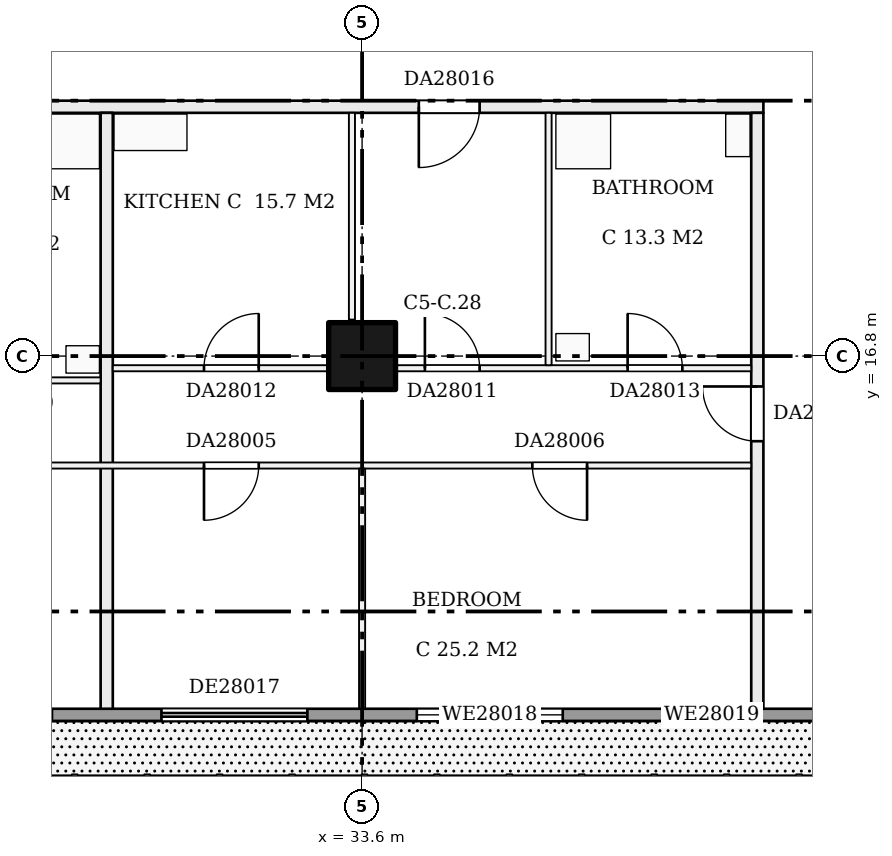
"""IFC4 building model, lengths in metres.
Left out: names, types, materials, properties, quantities, classifications, styles, units other than length and angle.
Written with IfcOpenShell. Run it as: python <this file> out.ifc"""

import sys

from ifc_helpers import new_model, si_unit, direction, frame, frame_2d, origin, origin_2d, place, context, subcontext, project, spatial, rectangle, extrude, element, fill, save


model = new_model("IFC4")
c1 = context("Model", 3, precision=1e-05, world=origin(), true_north=direction((0.0, 1.0)))
c2 = subcontext(c1, "Body", "Model", "MODEL_VIEW")
j1 = project(units=[si_unit("LENGTHUNIT", "METRE"), si_unit("PLANEANGLEUNIT", "RADIAN")], contexts=[c1])
p1 = place(None, origin())
s1 = spatial("IfcSite", under=j1, at=p1, CompositionType="ELEMENT")
p2 = place(p1, origin())
s2 = spatial("IfcBuilding", under=s1, at=p2, CompositionType="ELEMENT")
p3 = place(p2, frame((0.0, 0.0, 112.7)))
s3 = spatial("IfcBuildingStorey", under=s2, at=p3, CompositionType="ELEMENT", Elevation=112.7)
p4 = place(p3, frame((33.6, 16.8, 0.0), z_axis=(0.0, 0.0, 1.0), x_axis=(1.0, 0.0, 0.0)))
e1 = element("IfcColumn", 1, at=p4, inside=s3, PredefinedType="COLUMN", context=c2, shape_type="SweptSolid", body=[
    extrude(rectangle(XDim=1.1, YDim=1.1, at=origin_2d()), origin(), (0.0, 0.0, 1.0), 3.22),
])
p5 = place(p3, frame((16.9, 15.0, 0.0), z_axis=(0.0, 0.0, 1.0), x_axis=(1.0, 0.0, 0.0)))
e2 = element("IfcWall", 2, at=p5, inside=s3, PredefinedType="PARTITIONING", context=c2, shape_type="SweptSolid", body=[
    extrude(rectangle(XDim=23.1, YDim=0.1, at=frame_2d((11.55, 0.0))), origin(), (0.0, 0.0, 1.0), 3.22),
])
p6 = place(p5, frame((1.6, 0.0, 0.0)))
e3 = element("IfcOpeningElement", 3, at=p6, cuts=e2, PredefinedType="OPENING", context=c2, shape_type="SweptSolid", body=[
    extrude(rectangle(XDim=0.9, YDim=2.1, at=frame_2d((0.45, 1.05))), frame((0.0, 0.06, 0.0), z_axis=(0.0, -1.0, 0.0), x_axis=(1.0, 0.0, 0.0)), (0.0, 0.0, 1.0), 0.12),
])
p7 = place(p5, frame((5.8, 0.0, 0.0)))
e4 = element("IfcOpeningElement", 4, at=p7, cuts=e2, PredefinedType="OPENING", context=c2, shape_type="SweptSolid", body=[
    extrude(rectangle(XDim=0.9, YDim=2.1, at=frame_2d((0.45, 1.05))), frame((0.0, 0.06, 0.0), z_axis=(0.0, -1.0, 0.0), x_axis=(1.0, 0.0, 0.0)), (0.0, 0.0, 1.0), 0.12),
])
p8 = place(p5, frame((9.9, 0.0, 0.0)))
e5 = element("IfcOpeningElement", 5, at=p8, cuts=e2, PredefinedType="OPENING", context=c2, shape_type="SweptSolid", body=[
    extrude(rectangle(XDim=0.9, YDim=2.1, at=frame_2d((0.45, 1.05))), frame((0.0, 0.06, 0.0), z_axis=(0.0, -1.0, 0.0), x_axis=(1.0, 0.0, 0.0)), (0.0, 0.0, 1.0), 0.12),
])
p9 = place(p5, frame((14.1, 0.0, 0.0)))
e6 = element("IfcOpeningElement", 6, at=p9, cuts=e2, PredefinedType="OPENING", context=c2, shape_type="SweptSolid", body=[
    extrude(rectangle(XDim=0.9, YDim=2.1, at=frame_2d((0.45, 1.05))), frame((0.0, 0.06, 0.0), z_axis=(0.0, -1.0, 0.0), x_axis=(1.0, 0.0, 0.0)), (0.0, 0.0, 1.0), 0.12),
])
p10 = place(p5, frame((19.5, 0.0, 0.0)))
e7 = element("IfcOpeningElement", 7, at=p10, cuts=e2, PredefinedType="OPENING", context=c2, shape_type="SweptSolid", body=[
    extrude(rectangle(XDim=0.9, YDim=2.1, at=frame_2d((0.45, 1.05))), frame((0.0, 0.06, 0.0), z_axis=(0.0, -1.0, 0.0), x_axis=(1.0, 0.0, 0.0)), (0.0, 0.0, 1.0), 0.12),
])
p11 = place(p3, frame((16.9, 16.4, 0.0), z_axis=(0.0, 0.0, 1.0), x_axis=(1.0, 0.0, 0.0)))
e8 = element("IfcWall", 8, at=p11, inside=s3, PredefinedType="PARTITIONING", context=c2, shape_type="SweptSolid", body=[
    extrude(rectangle(XDim=12.4, YDim=0.1, at=frame_2d((6.2, 0.0))), origin(), (0.0, 0.0, 1.0), 3.22),
])
p12 = place(p11, frame((1.7, 0.0, 0.0)))
e9 = element("IfcOpeningElement", 9, at=p12, cuts=e8, PredefinedType="OPENING", context=c2, shape_type="SweptSolid", body=[
    extrude(rectangle(XDim=0.9, YDim=2.1, at=frame_2d((0.45, 1.05))), frame((0.0, 0.06, 0.0), z_axis=(0.0, -1.0, 0.0), x_axis=(1.0, 0.0, 0.0)), (0.0, 0.0, 1.0), 0.12),
])
p13 = place(p11, frame((3.775, 0.0, 0.0)))
e10 = element("IfcOpeningElement", 10, at=p13, cuts=e8, PredefinedType="OPENING", context=c2, shape_type="SweptSolid", body=[
    extrude(rectangle(XDim=0.9, YDim=2.1, at=frame_2d((0.45, 1.05))), frame((0.0, 0.06, 0.0), z_axis=(0.0, -1.0, 0.0), x_axis=(1.0, 0.0, 0.0)), (0.0, 0.0, 1.0), 0.12),
])
p14 = place(p11, frame((6.65, 0.0, 0.0)))
e11 = element("IfcOpeningElement", 11, at=p14, cuts=e8, PredefinedType="OPENING", context=c2, shape_type="SweptSolid", body=[
    extrude(rectangle(XDim=0.9, YDim=2.1, at=frame_2d((0.45, 1.05))), frame((0.0, 0.06, 0.0), z_axis=(0.0, -1.0, 0.0), x_axis=(1.0, 0.0, 0.0)), (0.0, 0.0, 1.0), 0.12),
])
p15 = place(p11, frame((10.425, 0.0, 0.0)))
e12 = element("IfcOpeningElement", 12, at=p15, cuts=e8, PredefinedType="OPENING", context=c2, shape_type="SweptSolid", body=[
    extrude(rectangle(XDim=0.9, YDim=2.1, at=frame_2d((0.45, 1.05))), frame((0.0, 0.06, 0.0), z_axis=(0.0, -1.0, 0.0), x_axis=(1.0, 0.0, 0.0)), (0.0, 0.0, 1.0), 0.12),
])
p16 = place(p3, frame((29.5, 16.6, 0.0), z_axis=(0.0, 0.0, 1.0), x_axis=(1.0, 0.0, 0.0)))
e13 = element("IfcWall", 13, at=p16, inside=s3, PredefinedType="PARTITIONING", context=c2, shape_type="SweptSolid", body=[
    extrude(rectangle(XDim=10.5, YDim=0.1, at=frame_2d((5.25, 0.0))), origin(), (0.0, 0.0, 1.0), 3.22),
])
p17 = place(p16, frame((5.133, 0.0, 0.0)))
e14 = element("IfcOpeningElement", 14, at=p17, cuts=e13, PredefinedType="OPENING", context=c2, shape_type="SweptSolid", body=[
    extrude(rectangle(XDim=0.9, YDim=2.1, at=frame_2d((0.45, 1.05))), frame((0.0, 0.06, 0.0), z_axis=(0.0, -1.0, 0.0), x_axis=(1.0, 0.0, 0.0)), (0.0, 0.0, 1.0), 0.12),
])
p18 = place(p16, frame((1.5, 0.0, 0.0)))
e15 = element("IfcOpeningElement", 15, at=p18, cuts=e13, PredefinedType="OPENING", context=c2, shape_type="SweptSolid", body=[
    extrude(rectangle(XDim=0.9, YDim=2.1, at=frame_2d((0.45, 1.05))), frame((0.0, 0.06, 0.0), z_axis=(0.0, -1.0, 0.0), x_axis=(1.0, 0.0, 0.0)), (0.0, 0.0, 1.0), 0.12),
])
p19 = place(p16, frame((8.467, 0.0, 0.0)))
e16 = element("IfcOpeningElement", 16, at=p19, cuts=e13, PredefinedType="OPENING", context=c2, shape_type="SweptSolid", body=[
    extrude(rectangle(XDim=0.9, YDim=2.1, at=frame_2d((0.45, 1.05))), frame((0.0, 0.06, 0.0), z_axis=(0.0, -1.0, 0.0), x_axis=(1.0, 0.0, 0.0)), (0.0, 0.0, 1.0), 0.12),
])
p20 = place(p3, frame((16.9, 20.9, 0.0), z_axis=(0.0, 0.0, 1.0), x_axis=(1.0, 0.0, 0.0)))
e17 = element("IfcWall", 17, at=p20, inside=s3, PredefinedType="PARTITIONING", context=c2, shape_type="SweptSolid", body=[
    extrude(rectangle(XDim=23.3, YDim=0.2, at=frame_2d((11.65, 0.0))), origin(), (0.0, 0.0, 1.0), 3.22),
])
p21 = place(p20, frame((1.0, 0.0, 0.0)))
e18 = element("IfcOpeningElement", 18, at=p21, cuts=e17, PredefinedType="OPENING", context=c2, shape_type="SweptSolid", body=[
    extrude(rectangle(XDim=1.0, YDim=2.1, at=frame_2d((0.5, 1.05))), frame((0.0, 0.11, 0.0), z_axis=(0.0, -1.0, 0.0), x_axis=(1.0, 0.0, 0.0)), (0.0, 0.0, 1.0), 0.22),
])
p22 = place(p20, frame((17.633, 0.0, 0.0)))
e19 = element("IfcOpeningElement", 19, at=p22, cuts=e17, PredefinedType="OPENING", context=c2, shape_type="SweptSolid", body=[
    extrude(rectangle(XDim=1.0, YDim=2.1, at=frame_2d((0.5, 1.05))), frame((0.0, 0.11, 0.0), z_axis=(0.0, -1.0, 0.0), x_axis=(1.0, 0.0, 0.0)), (0.0, 0.0, 1.0), 0.22),
])
p23 = place(p3, frame((29.4, 10.9, 0.0), z_axis=(0.0, 0.0, 1.0), x_axis=(0.0, 1.0, 0.0)))
e20 = element("IfcWall", 20, at=p23, inside=s3, PredefinedType="PARTITIONING", context=c2, shape_type="SweptSolid", body=[
    extrude(rectangle(XDim=9.9, YDim=0.2, at=frame_2d((4.95, 0.0))), origin(), (0.0, 0.0, 1.0), 3.22),
])
p24 = place(p3, frame((33.433, 17.4, 0.0), z_axis=(0.0, 0.0, 1.0), x_axis=(0.0, 1.0, 0.0)))
e21 = element("IfcWall", 21, at=p24, inside=s3, PredefinedType="PARTITIONING", context=c2, shape_type="SweptSolid", body=[
    extrude(rectangle(XDim=3.4, YDim=0.1, at=frame_2d((1.7, 0.0))), origin(), (0.0, 0.0, 1.0), 3.22),
])
p25 = place(p3, frame((33.6, 10.9, 0.0), z_axis=(0.0, 0.0, 1.0), x_axis=(0.0, 1.0, 0.0)))
e22 = element("IfcWall", 22, at=p25, inside=s3, PredefinedType="PARTITIONING", context=c2, shape_type="SweptSolid", body=[
    extrude(rectangle(XDim=4.05, YDim=0.1, at=frame_2d((2.025, 0.0))), origin(), (0.0, 0.0, 1.0), 3.22),
])
p26 = place(p3, frame((36.667, 16.65, 0.0), z_axis=(0.0, 0.0, 1.0), x_axis=(0.0, 1.0, 0.0)))
e23 = element("IfcWall", 23, at=p26, inside=s3, PredefinedType="PARTITIONING", context=c2, shape_type="SweptSolid", body=[
    extrude(rectangle(XDim=4.15, YDim=0.1, at=frame_2d((2.075, 0.0))), origin(), (0.0, 0.0, 1.0), 3.22),
])
p27 = place(p3, frame((40.1, 10.9, 0.0), z_axis=(0.0, 0.0, 1.0), x_axis=(0.0, 1.0, 0.0)))
e24 = element("IfcWall", 24, at=p27, inside=s3, PredefinedType="PARTITIONING", context=c2, shape_type="SweptSolid", body=[
    extrude(rectangle(XDim=9.9, YDim=0.2, at=frame_2d((4.95, 0.0))), origin(), (0.0, 0.0, 1.0), 3.22),
])
p28 = place(p27, frame((4.5, 0.0, 0.0)))
e25 = element("IfcOpeningElement", 25, at=p28, cuts=e24, PredefinedType="OPENING", context=c2, shape_type="SweptSolid", body=[
    extrude(rectangle(XDim=0.9, YDim=2.1, at=frame_2d((0.45, 1.05))), frame((0.0, 0.11, 0.0), z_axis=(0.0, -1.0, 0.0), x_axis=(1.0, 0.0, 0.0)), (0.0, 0.0, 1.0), 0.22),
])
p29 = place(p3, frame((4.8, 10.9, 0.0), z_axis=(0.0, 0.0, 1.0), x_axis=(1.0, 0.0, 0.0)))
e26 = element("IfcWall", 26, at=p29, inside=s3, PredefinedType="SOLIDWALL", context=c2, shape_type="SweptSolid", body=[
    extrude(rectangle(XDim=37.2, YDim=0.2, at=frame_2d((18.6, 0.0))), origin(), (0.0, 0.0, 1.0), 3.22),
])
p30 = place(p29, frame((0.3, 0.0, 0.9)))
e27 = element("IfcOpeningElement", 27, at=p30, cuts=e26, PredefinedType="OPENING", context=c2, shape_type="SweptSolid", body=[
    extrude(rectangle(XDim=2.4, YDim=1.5, at=frame_2d((1.2, 0.75))), frame((0.0, 0.11, 0.0), z_axis=(0.0, -1.0, 0.0), x_axis=(1.0, 0.0, 0.0)), (0.0, 0.0, 1.0), 0.22),
])
p31 = place(p29, frame((4.2, 0.0, 0.9)))
e28 = element("IfcOpeningElement", 28, at=p31, cuts=e26, PredefinedType="OPENING", context=c2, shape_type="SweptSolid", body=[
    extrude(rectangle(XDim=2.4, YDim=1.5, at=frame_2d((1.2, 0.75))), frame((0.0, 0.11, 0.0), z_axis=(0.0, -1.0, 0.0), x_axis=(1.0, 0.0, 0.0)), (0.0, 0.0, 1.0), 0.22),
])
p32 = place(p29, frame((12.9, 0.0, 0.0)))
e29 = element("IfcOpeningElement", 29, at=p32, cuts=e26, PredefinedType="OPENING", context=c2, shape_type="SweptSolid", body=[
    extrude(rectangle(XDim=2.4, YDim=2.2, at=frame_2d((1.2, 1.1))), frame((0.0, 0.11, 0.0), z_axis=(0.0, -1.0, 0.0), x_axis=(1.0, 0.0, 0.0)), (0.0, 0.0, 1.0), 0.22),
])
p33 = place(p29, frame((17.1, 0.0, 0.9)))
e30 = element("IfcOpeningElement", 30, at=p33, cuts=e26, PredefinedType="OPENING", context=c2, shape_type="SweptSolid", body=[
    extrude(rectangle(XDim=2.4, YDim=1.5, at=frame_2d((1.2, 0.75))), frame((0.0, 0.11, 0.0), z_axis=(0.0, -1.0, 0.0), x_axis=(1.0, 0.0, 0.0)), (0.0, 0.0, 1.0), 0.22),
])
p34 = place(p29, frame((21.3, 0.0, 0.9)))
e31 = element("IfcOpeningElement", 31, at=p34, cuts=e26, PredefinedType="OPENING", context=c2, shape_type="SweptSolid", body=[
    extrude(rectangle(XDim=2.4, YDim=1.5, at=frame_2d((1.2, 0.75))), frame((0.0, 0.11, 0.0), z_axis=(0.0, -1.0, 0.0), x_axis=(1.0, 0.0, 0.0)), (0.0, 0.0, 1.0), 0.22),
])
p35 = place(p29, frame((25.5, 0.0, 0.0)))
e32 = element("IfcOpeningElement", 32, at=p35, cuts=e26, PredefinedType="OPENING", context=c2, shape_type="SweptSolid", body=[
    extrude(rectangle(XDim=2.4, YDim=2.2, at=frame_2d((1.2, 1.1))), frame((0.0, 0.11, 0.0), z_axis=(0.0, -1.0, 0.0), x_axis=(1.0, 0.0, 0.0)), (0.0, 0.0, 1.0), 0.22),
])
p36 = place(p29, frame((29.7, 0.0, 0.9)))
e33 = element("IfcOpeningElement", 33, at=p36, cuts=e26, PredefinedType="OPENING", context=c2, shape_type="SweptSolid", body=[
    extrude(rectangle(XDim=2.4, YDim=1.5, at=frame_2d((1.2, 0.75))), frame((0.0, 0.11, 0.0), z_axis=(0.0, -1.0, 0.0), x_axis=(1.0, 0.0, 0.0)), (0.0, 0.0, 1.0), 0.22),
])
p37 = place(p29, frame((33.9, 0.0, 0.9)))
e34 = element("IfcOpeningElement", 34, at=p37, cuts=e26, PredefinedType="OPENING", context=c2, shape_type="SweptSolid", body=[
    extrude(rectangle(XDim=1.3, YDim=1.5, at=frame_2d((0.65, 0.75))), frame((0.0, 0.11, 0.0), z_axis=(0.0, -1.0, 0.0), x_axis=(1.0, 0.0, 0.0)), (0.0, 0.0, 1.0), 0.22),
])
p38 = place(p9, frame((0.9, 0.0, 0.0), z_axis=(0.0, 0.0, 1.0), x_axis=(-1.0, 0.0, 0.0)))
e35 = element("IfcDoor", 35, at=p38, inside=s3, OperationType="SINGLE_SWING_RIGHT", PredefinedType="DOOR", context=c2, shape_type="SweptSolid", body=[
    extrude(rectangle(XDim=0.9, YDim=2.1, at=frame_2d((0.45, 1.05))), frame((0.0, 0.025, 0.0), z_axis=(0.0, -1.0, 0.0), x_axis=(1.0, 0.0, 0.0)), (0.0, 0.0, 1.0), 0.05),
])
fill(e6, e35)
p39 = place(p10, frame((0.9, 0.0, 0.0), z_axis=(0.0, 0.0, 1.0), x_axis=(-1.0, 0.0, 0.0)))
e36 = element("IfcDoor", 36, at=p39, inside=s3, OperationType="SINGLE_SWING_LEFT", PredefinedType="DOOR", context=c2, shape_type="SweptSolid", body=[
    extrude(rectangle(XDim=0.9, YDim=2.1, at=frame_2d((0.45, 1.05))), frame((0.0, 0.025, 0.0), z_axis=(0.0, -1.0, 0.0), x_axis=(1.0, 0.0, 0.0)), (0.0, 0.0, 1.0), 0.05),
])
fill(e7, e36)
p40 = place(p17, origin())
e37 = element("IfcDoor", 37, at=p40, inside=s3, OperationType="SINGLE_SWING_LEFT", PredefinedType="DOOR", context=c2, shape_type="SweptSolid", body=[
    extrude(rectangle(XDim=0.9, YDim=2.1, at=frame_2d((0.45, 1.05))), frame((0.0, 0.025, 0.0), z_axis=(0.0, -1.0, 0.0), x_axis=(1.0, 0.0, 0.0)), (0.0, 0.0, 1.0), 0.05),
])
fill(e14, e37)
p41 = place(p18, origin())
e38 = element("IfcDoor", 38, at=p41, inside=s3, OperationType="SINGLE_SWING_RIGHT", PredefinedType="DOOR", context=c2, shape_type="SweptSolid", body=[
    extrude(rectangle(XDim=0.9, YDim=2.1, at=frame_2d((0.45, 1.05))), frame((0.0, 0.025, 0.0), z_axis=(0.0, -1.0, 0.0), x_axis=(1.0, 0.0, 0.0)), (0.0, 0.0, 1.0), 0.05),
])
fill(e15, e38)
p42 = place(p19, origin())
e39 = element("IfcDoor", 39, at=p42, inside=s3, OperationType="SINGLE_SWING_LEFT", PredefinedType="DOOR", context=c2, shape_type="SweptSolid", body=[
    extrude(rectangle(XDim=0.9, YDim=2.1, at=frame_2d((0.45, 1.05))), frame((0.0, 0.025, 0.0), z_axis=(0.0, -1.0, 0.0), x_axis=(1.0, 0.0, 0.0)), (0.0, 0.0, 1.0), 0.05),
])
fill(e16, e39)
p43 = place(p22, frame((1.0, 0.0, 0.0), z_axis=(0.0, 0.0, 1.0), x_axis=(-1.0, 0.0, 0.0)))
e40 = element("IfcDoor", 40, at=p43, inside=s3, OperationType="SINGLE_SWING_RIGHT", PredefinedType="DOOR", context=c2, shape_type="SweptSolid", body=[
    extrude(rectangle(XDim=1.0, YDim=2.1, at=frame_2d((0.5, 1.05))), frame((0.0, 0.025, 0.0), z_axis=(0.0, -1.0, 0.0), x_axis=(1.0, 0.0, 0.0)), (0.0, 0.0, 1.0), 0.05),
])
fill(e19, e40)
p44 = place(p28, origin())
e41 = element("IfcDoor", 41, at=p44, inside=s3, OperationType="SINGLE_SWING_RIGHT", PredefinedType="DOOR", context=c2, shape_type="SweptSolid", body=[
    extrude(rectangle(XDim=0.9, YDim=2.1, at=frame_2d((0.45, 1.05))), frame((0.0, 0.025, 0.0), z_axis=(0.0, -1.0, 0.0), x_axis=(1.0, 0.0, 0.0)), (0.0, 0.0, 1.0), 0.05),
])
fill(e25, e41)
p45 = place(p35, origin())
e42 = element("IfcDoor", 42, at=p45, inside=s3, OperationType="DOUBLE_DOOR_SLIDING", PredefinedType="DOOR", context=c2, shape_type="SweptSolid", body=[
    extrude(rectangle(XDim=2.4, YDim=2.2, at=frame_2d((1.2, 1.1))), frame((0.0, 0.025, 0.0), z_axis=(0.0, -1.0, 0.0), x_axis=(1.0, 0.0, 0.0)), (0.0, 0.0, 1.0), 0.05),
])
fill(e32, e42)
p46 = place(p36, origin())
e43 = element("IfcWindow", 43, at=p46, inside=s3, PartitioningType="SINGLE_PANEL", PredefinedType="WINDOW", context=c2, shape_type="SweptSolid", body=[
    extrude(rectangle(XDim=2.4, YDim=1.5, at=frame_2d((1.2, 0.75))), frame((0.0, 0.03, 0.0), z_axis=(0.0, -1.0, 0.0), x_axis=(1.0, 0.0, 0.0)), (0.0, 0.0, 1.0), 0.06),
])
fill(e33, e43)
p47 = place(p37, origin())
e44 = element("IfcWindow", 44, at=p47, inside=s3, PartitioningType="SINGLE_PANEL", PredefinedType="WINDOW", context=c2, shape_type="SweptSolid", body=[
    extrude(rectangle(XDim=1.3, YDim=1.5, at=frame_2d((0.65, 0.75))), frame((0.0, 0.03, 0.0), z_axis=(0.0, -1.0, 0.0), x_axis=(1.0, 0.0, 0.0)), (0.0, 0.0, 1.0), 0.06),
])
fill(e34, e44)
save(model, sys.argv[1])
